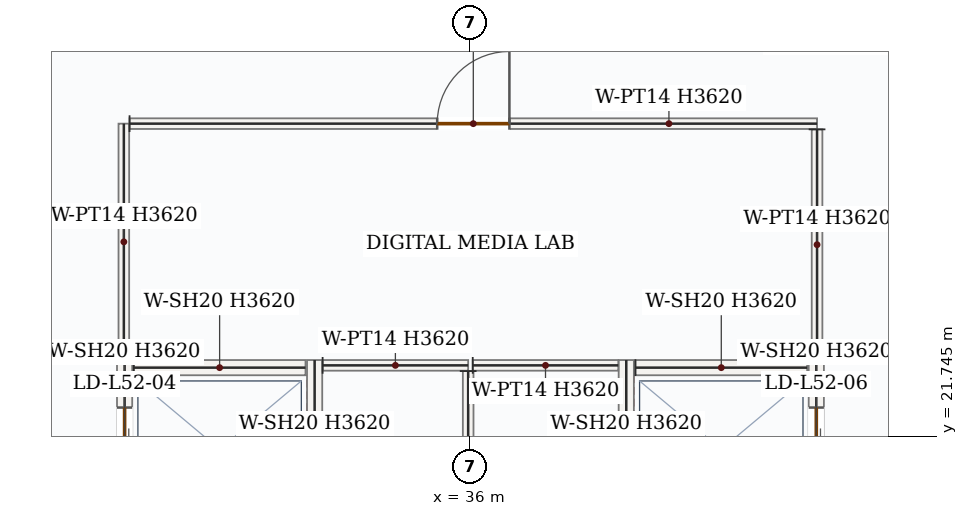
"""IFC4 building model, lengths in metres.
Left out: names, types, materials, properties, quantities, classifications, styles, units other than length and angle.
Written with IfcOpenShell. Run it as: python <this file> out.ifc"""

import sys

from ifc_helpers import new_model, si_unit, direction, frame, frame_2d, origin, place, context, subcontext, project, spatial, rectangle, extrude, source, transform, mapped, element, fill, save


model = new_model("IFC4")
c1 = context("Model", 3, precision=1e-05, world=origin(), true_north=direction((0.0, 1.0)))
c2 = subcontext(c1, "Body", "Model", "MODEL_VIEW")
j1 = project(units=[si_unit("LENGTHUNIT", "METRE"), si_unit("PLANEANGLEUNIT", "RADIAN")], contexts=[c1])
p1 = place(None, origin())
s1 = spatial("IfcSite", under=j1, at=p1, CompositionType="ELEMENT")
p2 = place(p1, origin())
s2 = spatial("IfcBuilding", under=s1, at=p2, CompositionType="ELEMENT")
p3 = place(p2, frame((0.0, 0.0, 221.4)))
s3 = spatial("IfcBuildingStorey", under=s2, at=p3, CompositionType="ELEMENT", Elevation=221.4)
p4 = place(p3, frame((31.45, 20.4, 0.0), z_axis=(0.0, 0.0, 1.0), x_axis=(0.0, 1.0, 0.0)))
e1 = element("IfcWall", 1, at=p4, inside=s3, PredefinedType="SOLIDWALL", context=c2, shape_type="SweptSolid", body=[
    extrude(rectangle(XDim=2.35, YDim=0.2, at=frame_2d((1.175, 0.0))), origin(), (0.0, 0.0, 1.0), 3.62),
])
p5 = place(p4, frame((0.625, 0.0, 0.0)))
e2 = element("IfcOpeningElement", 2, at=p5, cuts=e1, PredefinedType="OPENING", context=c2, shape_type="SweptSolid", body=[
    extrude(rectangle(XDim=1.1, YDim=2.15, at=frame_2d((0.55, 1.075))), frame((0.0, 0.11, 0.0), z_axis=(0.0, -1.0, 0.0), x_axis=(1.0, 0.0, 0.0)), (0.0, 0.0, 1.0), 0.22),
])
m1 = source(origin(), c2, "Body", "SweptSolid", [
    extrude(rectangle(XDim=2.35, YDim=0.2, at=frame_2d((1.175, 0.0))), origin(), (0.0, 0.0, 1.0), 3.62),
])
p6 = place(p3, frame((33.95, 20.4, 0.0), z_axis=(0.0, 0.0, 1.0), x_axis=(0.0, 1.0, 0.0)))
e3 = element("IfcWall", 3, at=p6, inside=s3, PredefinedType="SOLIDWALL", context=c2, shape_type="MappedRepresentation", body=[
    mapped(m1, transform((0.0, 0.0, 0.0), x_axis=(1.0, 0.0, 0.0), y_axis=(0.0, 1.0, 0.0), z_axis=(0.0, 0.0, 1.0), scale=1.0)),
])
m2 = source(origin(), c2, "Body", "SweptSolid", [
    extrude(rectangle(XDim=2.26, YDim=0.2, at=frame_2d((1.13, 0.0))), origin(), (0.0, 0.0, 1.0), 3.62),
])
p7 = place(p3, frame((31.57, 22.65, 0.0), z_axis=(0.0, 0.0, 1.0), x_axis=(1.0, 0.0, 0.0)))
e4 = element("IfcWall", 4, at=p7, inside=s3, PredefinedType="SOLIDWALL", context=c2, shape_type="MappedRepresentation", body=[
    mapped(m2, transform((0.0, 0.0, 0.0), x_axis=(1.0, 0.0, 0.0), y_axis=(0.0, 1.0, 0.0), z_axis=(0.0, 0.0, 1.0), scale=1.0)),
])
p8 = place(p3, frame((38.05, 20.4, 0.0), z_axis=(0.0, 0.0, 1.0), x_axis=(0.0, 1.0, 0.0)))
e5 = element("IfcWall", 5, at=p8, inside=s3, PredefinedType="SOLIDWALL", context=c2, shape_type="MappedRepresentation", body=[
    mapped(m1, transform((0.0, 0.0, 0.0), x_axis=(1.0, 0.0, 0.0), y_axis=(0.0, 1.0, 0.0), z_axis=(0.0, 0.0, 1.0), scale=1.0)),
])
p9 = place(p3, frame((40.55, 20.4, 0.0), z_axis=(0.0, 0.0, 1.0), x_axis=(0.0, 1.0, 0.0)))
e6 = element("IfcWall", 6, at=p9, inside=s3, PredefinedType="SOLIDWALL", context=c2, shape_type="SweptSolid", body=[
    extrude(rectangle(XDim=2.35, YDim=0.2, at=frame_2d((1.175, 0.0))), origin(), (0.0, 0.0, 1.0), 3.62),
])
p10 = place(p9, frame((0.625, 0.0, 0.0)))
e7 = element("IfcOpeningElement", 7, at=p10, cuts=e6, PredefinedType="OPENING", context=c2, shape_type="SweptSolid", body=[
    extrude(rectangle(XDim=1.1, YDim=2.15, at=frame_2d((0.55, 1.075))), frame((0.0, 0.11, 0.0), z_axis=(0.0, -1.0, 0.0), x_axis=(1.0, 0.0, 0.0)), (0.0, 0.0, 1.0), 0.22),
])
p11 = place(p3, frame((38.17, 22.65, 0.0), z_axis=(0.0, 0.0, 1.0), x_axis=(1.0, 0.0, 0.0)))
e8 = element("IfcWall", 8, at=p11, inside=s3, PredefinedType="SOLIDWALL", context=c2, shape_type="MappedRepresentation", body=[
    mapped(m2, transform((0.0, 0.0, 0.0), x_axis=(1.0, 0.0, 0.0), y_axis=(0.0, 1.0, 0.0), z_axis=(0.0, 0.0, 1.0), scale=1.0)),
])
m3 = source(origin(), c2, "Body", "SweptSolid", [
    extrude(rectangle(XDim=1.915, YDim=0.14, at=frame_2d((0.958, 0.0))), origin(), (0.0, 0.0, 1.0), 3.62),
])
p12 = place(p3, frame((34.055, 22.68, 0.0), z_axis=(0.0, 0.0, 1.0), x_axis=(1.0, 0.0, 0.0)))
e9 = element("IfcWall", 9, at=p12, inside=s3, PredefinedType="PARTITIONING", context=c2, shape_type="MappedRepresentation", body=[
    mapped(m3, transform((0.0, 0.0, 0.0), x_axis=(1.0, 0.0, 0.0), y_axis=(0.0, 1.0, 0.0), z_axis=(0.0, 0.0, 1.0), scale=1.0)),
])
m4 = source(origin(), c2, "Body", "SweptSolid", [
    extrude(rectangle(XDim=4.245, YDim=0.14, at=frame_2d((2.123, 0.0))), origin(), (0.0, 0.0, 1.0), 3.62),
])
p13 = place(p3, frame((35.97, 22.605, 0.0), z_axis=(0.0, 0.0, 1.0), x_axis=(0.0, -1.0, 0.0)))
e10 = element("IfcWall", 10, at=p13, inside=s3, PredefinedType="PARTITIONING", context=c2, shape_type="MappedRepresentation", body=[
    mapped(m4, transform((0.0, 0.0, 0.0), x_axis=(1.0, 0.0, 0.0), y_axis=(0.0, 1.0, 0.0), z_axis=(0.0, 0.0, 1.0), scale=1.0)),
])
p14 = place(p3, frame((36.03, 22.68, 0.0), z_axis=(0.0, 0.0, 1.0), x_axis=(1.0, 0.0, 0.0)))
e11 = element("IfcWall", 11, at=p14, inside=s3, PredefinedType="PARTITIONING", context=c2, shape_type="MappedRepresentation", body=[
    mapped(m3, transform((0.0, 0.0, 0.0), x_axis=(1.0, 0.0, 0.0), y_axis=(0.0, 1.0, 0.0), z_axis=(0.0, 0.0, 1.0), scale=1.0)),
])
m5 = source(origin(), c2, "Body", "SweptSolid", [
    extrude(rectangle(XDim=3.11, YDim=0.14, at=frame_2d((1.555, 0.0))), origin(), (0.0, 0.0, 1.0), 3.62),
])
p15 = place(p3, frame((31.44, 22.75, 0.0), z_axis=(0.0, 0.0, 1.0), x_axis=(0.0, 1.0, 0.0)))
e12 = element("IfcWall", 12, at=p15, inside=s3, PredefinedType="PARTITIONING", context=c2, shape_type="MappedRepresentation", body=[
    mapped(m5, transform((0.0, 0.0, 0.0), x_axis=(1.0, 0.0, 0.0), y_axis=(0.0, 1.0, 0.0), z_axis=(0.0, 0.0, 1.0), scale=1.0)),
])
p16 = place(p3, frame((31.515, 25.86, 0.0), z_axis=(0.0, 0.0, 1.0), x_axis=(1.0, 0.0, 0.0)))
e13 = element("IfcWall", 13, at=p16, inside=s3, PredefinedType="PARTITIONING", context=c2, shape_type="SweptSolid", body=[
    extrude(rectangle(XDim=9.045, YDim=0.14, at=frame_2d((4.522, 0.0))), origin(), (0.0, 0.0, 1.0), 3.62),
])
p17 = place(p16, frame((4.048, 0.0, 0.0)))
e14 = element("IfcOpeningElement", 14, at=p17, cuts=e13, PredefinedType="OPENING", context=c2, shape_type="SweptSolid", body=[
    extrude(rectangle(XDim=0.95, YDim=2.15, at=frame_2d((0.475, 1.075))), frame((0.0, 0.08, 0.0), z_axis=(0.0, -1.0, 0.0), x_axis=(1.0, 0.0, 0.0)), (0.0, 0.0, 1.0), 0.16),
])
m6 = source(origin(), c2, "Body", "SweptSolid", [
    extrude(rectangle(XDim=3.035, YDim=0.14, at=frame_2d((1.518, 0.0))), origin(), (0.0, 0.0, 1.0), 3.62),
])
p18 = place(p3, frame((40.56, 25.785, 0.0), z_axis=(0.0, 0.0, 1.0), x_axis=(0.0, -1.0, 0.0)))
e15 = element("IfcWall", 15, at=p18, inside=s3, PredefinedType="PARTITIONING", context=c2, shape_type="MappedRepresentation", body=[
    mapped(m6, transform((0.0, 0.0, 0.0), x_axis=(1.0, 0.0, 0.0), y_axis=(0.0, 1.0, 0.0), z_axis=(0.0, 0.0, 1.0), scale=1.0)),
])
m7 = source(origin(), c2, "Body", "SweptSolid", [
    extrude(rectangle(XDim=1.1, YDim=2.15, at=frame_2d((0.55, 1.075))), frame((0.0, 0.025, 0.0), z_axis=(0.0, -1.0, 0.0), x_axis=(1.0, 0.0, 0.0)), (0.0, 0.0, 1.0), 0.05),
])
p19 = place(p5, origin())
e16 = element("IfcDoor", 16, at=p19, inside=s3, OperationType="DOUBLE_DOOR_SLIDING", PredefinedType="DOOR", context=c2, shape_type="MappedRepresentation", body=[
    mapped(m7, transform((0.0, 0.0, 0.0), x_axis=(1.0, 0.0, 0.0), y_axis=(0.0, 1.0, 0.0), z_axis=(0.0, 0.0, 1.0), scale=1.0)),
])
fill(e2, e16)
p20 = place(p10, origin())
e17 = element("IfcDoor", 17, at=p20, inside=s3, OperationType="DOUBLE_DOOR_SLIDING", PredefinedType="DOOR", context=c2, shape_type="MappedRepresentation", body=[
    mapped(m7, transform((0.0, 0.0, 0.0), x_axis=(1.0, 0.0, 0.0), y_axis=(0.0, 1.0, 0.0), z_axis=(0.0, 0.0, 1.0), scale=1.0)),
])
fill(e7, e17)
m8 = source(origin(), c2, "Body", "SweptSolid", [
    extrude(rectangle(XDim=0.95, YDim=2.15, at=frame_2d((0.475, 1.075))), frame((0.0, 0.025, 0.0), z_axis=(0.0, -1.0, 0.0), x_axis=(1.0, 0.0, 0.0)), (0.0, 0.0, 1.0), 0.05),
])
p21 = place(p17, origin())
e18 = element("IfcDoor", 18, at=p21, inside=s3, OperationType="SINGLE_SWING_RIGHT", PredefinedType="DOOR", context=c2, shape_type="MappedRepresentation", body=[
    mapped(m8, transform((0.0, 0.0, 0.0), x_axis=(1.0, 0.0, 0.0), y_axis=(0.0, 1.0, 0.0), z_axis=(0.0, 0.0, 1.0), scale=1.0)),
])
fill(e14, e18)
save(model, sys.argv[1])
